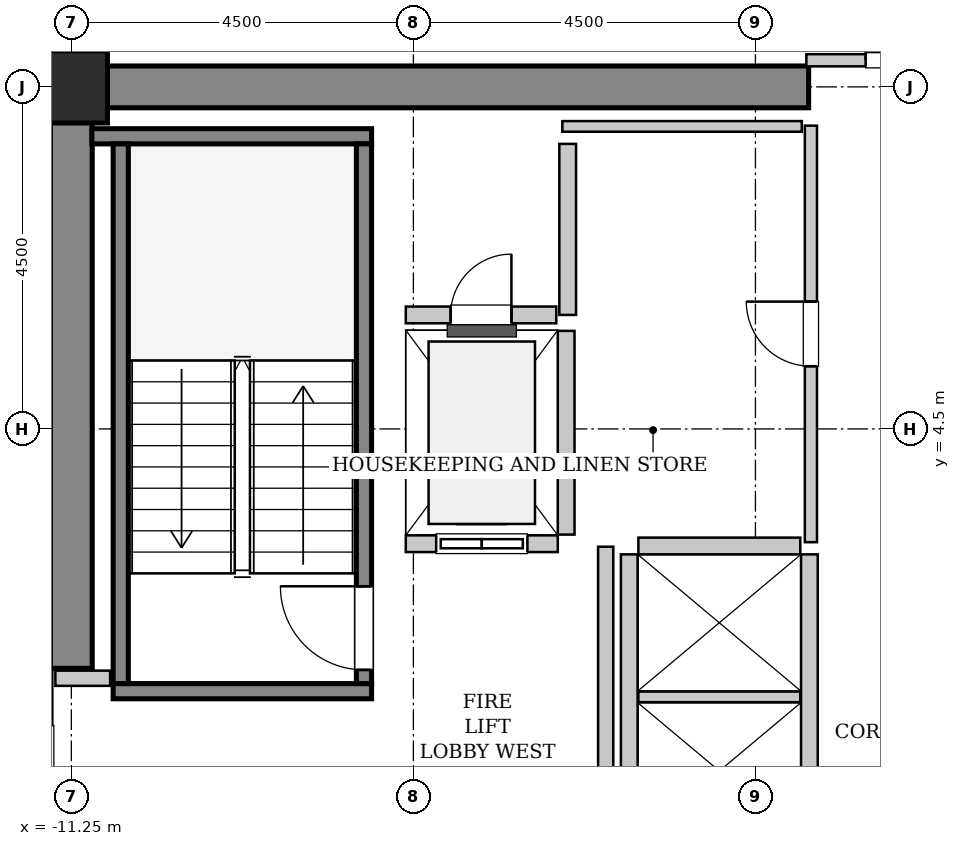
"""IFC4 building model, lengths in metres.
Left out: names, types, materials, properties, quantities, classifications, styles, units other than length and angle.
Written with IfcOpenShell. Run it as: python <this file> out.ifc"""

import sys

from ifc_helpers import new_model, si_unit, direction, frame, frame_2d, origin, origin_2d, place, context, subcontext, project, spatial, rectangle, hollow_rectangle, extrude, source, transform, mapped, element, fill, save


model = new_model("IFC4")
c1 = context("Model", 3, precision=1e-05, world=origin(), true_north=direction((0.0, 1.0)))
c2 = subcontext(c1, "Body", "Model", "MODEL_VIEW")
j1 = project(units=[si_unit("LENGTHUNIT", "METRE"), si_unit("PLANEANGLEUNIT", "RADIAN")], contexts=[c1])
p1 = place(None, origin())
s1 = spatial("IfcSite", under=j1, at=p1, CompositionType="ELEMENT")
p2 = place(p1, origin())
s2 = spatial("IfcBuilding", under=s1, at=p2, CompositionType="ELEMENT")
p3 = place(p2, frame((0.0, 0.0, 164.0)))
s3 = spatial("IfcBuildingStorey", under=s2, at=p3, CompositionType="ELEMENT", Elevation=164.0)
m1 = source(origin(), c2, "Body", "SweptSolid", [
    extrude(rectangle(XDim=9.975, YDim=0.55, at=frame_2d((4.987, 0.0))), origin(), (0.0, 0.0, 1.0), 3.8),
])
p4 = place(p3, frame((-11.525, 9.0, 0.0), z_axis=(0.0, 0.0, 1.0), x_axis=(1.0, 0.0, 0.0)))
e1 = element("IfcWall", 1, at=p4, inside=s3, PredefinedType="SHEAR", context=c2, shape_type="MappedRepresentation", body=[
    mapped(m1, transform((0.0, 0.0, 0.0), x_axis=(1.0, 0.0, 0.0), y_axis=(0.0, 1.0, 0.0), z_axis=(0.0, 0.0, 1.0), scale=1.0)),
])
m2 = source(origin(), c2, "Body", "SweptSolid", [
    extrude(rectangle(XDim=7.375, YDim=0.55, at=frame_2d((3.688, 0.0))), origin(), (0.0, 0.0, 1.0), 3.8),
])
p5 = place(p3, frame((-11.25, 1.35, 0.0), z_axis=(0.0, 0.0, 1.0), x_axis=(0.0, 1.0, 0.0)))
e2 = element("IfcWall", 2, at=p5, inside=s3, PredefinedType="SHEAR", context=c2, shape_type="MappedRepresentation", body=[
    mapped(m2, transform((0.0, 0.0, 0.0), x_axis=(1.0, 0.0, 0.0), y_axis=(0.0, 1.0, 0.0), z_axis=(0.0, 0.0, 1.0), scale=1.0)),
])
m3 = source(origin(), c2, "Body", "SweptSolid", [
    extrude(hollow_rectangle(XDim=0.95, YDim=0.95, WallThickness=0.045, InnerFilletRadius=0.045, OuterFilletRadius=0.09, at=origin_2d()), origin(), (0.0, 0.0, 1.0), 3.8),
])
p6 = place(p3, frame((-11.25, 9.0, 0.0), z_axis=(0.0, 0.0, 1.0), x_axis=(1.0, 0.0, 0.0)))
e3 = element("IfcColumn", 3, at=p6, inside=s3, PredefinedType="COLUMN", context=c2, shape_type="MappedRepresentation", body=[
    mapped(m3, transform((0.0, 0.0, 0.0), x_axis=(1.0, 0.0, 0.0), y_axis=(0.0, 1.0, 0.0), z_axis=(0.0, 0.0, 1.0), scale=1.0)),
])
m4 = source(origin(), c2, "Body", "SweptSolid", [
    extrude(rectangle(XDim=3.4, YDim=0.2, at=frame_2d((1.7, 0.0))), origin(), (0.0, 0.0, 1.0), 3.8),
])
p7 = place(p3, frame((-7.3, 1.05, 0.0), z_axis=(0.0, 0.0, 1.0), x_axis=(-1.0, 0.0, 0.0)))
e4 = element("IfcWall", 4, at=p7, inside=s3, PredefinedType="SOLIDWALL", context=c2, shape_type="MappedRepresentation", body=[
    mapped(m4, transform((0.0, 0.0, 0.0), x_axis=(1.0, 0.0, 0.0), y_axis=(0.0, 1.0, 0.0), z_axis=(0.0, 0.0, 1.0), scale=1.0)),
])
m5 = source(origin(), c2, "Body", "SweptSolid", [
    extrude(rectangle(XDim=3.68, YDim=0.2, at=frame_2d((1.84, 0.0))), origin(), (0.0, 0.0, 1.0), 3.8),
])
p8 = place(p3, frame((-7.3, 8.35, 0.0), z_axis=(0.0, 0.0, 1.0), x_axis=(-1.0, 0.0, 0.0)))
e5 = element("IfcWall", 5, at=p8, inside=s3, PredefinedType="SOLIDWALL", context=c2, shape_type="MappedRepresentation", body=[
    mapped(m5, transform((0.0, 0.0, 0.0), x_axis=(1.0, 0.0, 0.0), y_axis=(0.0, 1.0, 0.0), z_axis=(0.0, 0.0, 1.0), scale=1.0)),
])
m6 = source(origin(), c2, "Body", "SweptSolid", [
    extrude(rectangle(XDim=7.1, YDim=0.2, at=frame_2d((3.55, 0.0))), origin(), (0.0, 0.0, 1.0), 3.8),
])
p9 = place(p3, frame((-7.4, 1.15, 0.0), z_axis=(0.0, 0.0, 1.0), x_axis=(0.0, 1.0, 0.0)))
e6 = element("IfcWall", 6, at=p9, inside=s3, PredefinedType="SOLIDWALL", context=c2, shape_type="MappedRepresentation", body=[
    mapped(m6, transform((0.0, 0.0, 0.0), x_axis=(1.0, 0.0, 0.0), y_axis=(0.0, 1.0, 0.0), z_axis=(0.0, 0.0, 1.0), scale=1.0)),
])
p10 = place(p9, frame((0.18, 0.0, 0.0)))
e7 = element("IfcOpeningElement", 7, at=p10, cuts=e6, PredefinedType="OPENING", context=c2, shape_type="SweptSolid", body=[
    extrude(rectangle(XDim=1.1, YDim=2.15, at=frame_2d((0.55, 1.075))), frame((0.0, 0.11, 0.0), z_axis=(0.0, -1.0, 0.0), x_axis=(1.0, 0.0, 0.0)), (0.0, 0.0, 1.0), 0.22),
])
p11 = place(p3, frame((-10.6, 1.15, 0.0), z_axis=(0.0, 0.0, 1.0), x_axis=(0.0, 1.0, 0.0)))
e8 = element("IfcWall", 8, at=p11, inside=s3, PredefinedType="SOLIDWALL", context=c2, shape_type="MappedRepresentation", body=[
    mapped(m6, transform((0.0, 0.0, 0.0), x_axis=(1.0, 0.0, 0.0), y_axis=(0.0, 1.0, 0.0), z_axis=(0.0, 0.0, 1.0), scale=1.0)),
])
m7 = source(origin(), c2, "Body", "SweptSolid", [
    extrude(rectangle(XDim=2.0, YDim=0.22, at=frame_2d((1.0, 0.0))), origin(), (0.0, 0.0, 1.0), 3.535),
])
p12 = place(p3, frame((-6.85, 2.99, 0.0), z_axis=(0.0, 0.0, 1.0), x_axis=(1.0, 0.0, 0.0)))
e9 = element("IfcWall", 9, at=p12, inside=s3, PredefinedType="SOLIDWALL", context=c2, shape_type="MappedRepresentation", body=[
    mapped(m7, transform((0.0, 0.0, 0.0), x_axis=(1.0, 0.0, 0.0), y_axis=(0.0, 1.0, 0.0), z_axis=(0.0, 0.0, 1.0), scale=1.0)),
])
p13 = place(p12, frame((0.4, 0.0, 0.0)))
e10 = element("IfcOpeningElement", 10, at=p13, cuts=e9, PredefinedType="OPENING", context=c2, shape_type="SweptSolid", body=[
    extrude(rectangle(XDim=1.2, YDim=2.2, at=frame_2d((0.6, 1.1))), frame((0.0, 0.12, 0.0), z_axis=(0.0, -1.0, 0.0), x_axis=(1.0, 0.0, 0.0)), (0.0, 0.0, 1.0), 0.24),
])
m8 = source(origin(), c2, "Body", "SweptSolid", [
    extrude(rectangle(XDim=2.68, YDim=0.22, at=frame_2d((1.34, 0.0))), origin(), (0.0, 0.0, 1.0), 3.535),
])
p14 = place(p3, frame((-4.74, 3.11, 0.0), z_axis=(0.0, 0.0, 1.0), x_axis=(0.0, 1.0, 0.0)))
e11 = element("IfcWall", 11, at=p14, inside=s3, PredefinedType="SOLIDWALL", context=c2, shape_type="MappedRepresentation", body=[
    mapped(m8, transform((0.0, 0.0, 0.0), x_axis=(1.0, 0.0, 0.0), y_axis=(0.0, 1.0, 0.0), z_axis=(0.0, 0.0, 1.0), scale=1.0)),
])
m9 = source(origin(), c2, "Body", "SweptSolid", [
    extrude(rectangle(XDim=5.7, YDim=0.22, at=frame_2d((2.85, 0.0))), origin(), (0.0, 0.0, 1.0), 3.535),
])
for number, where, z_axis, x_axis in (
    (12, (-1.54, -2.85, 0.0), (0.0, 0.0, 1.0), (0.0, 1.0, 0.0)),
    (13, (-3.91, 2.85, 0.0), (0.0, 0.0, 1.0), (0.0, -1.0, 0.0)),
):
    element("IfcWall", number, at=place(p3, frame(where, z_axis=z_axis, x_axis=x_axis)), inside=s3, PredefinedType="SOLIDWALL", context=c2, shape_type="MappedRepresentation", body=[
        mapped(m9, transform((0.0, 0.0, 0.0), x_axis=(1.0, 0.0, 0.0), y_axis=(0.0, 1.0, 0.0), z_axis=(0.0, 0.0, 1.0), scale=1.0)),
    ])
m10 = source(origin(), c2, "Body", "SweptSolid", [
    extrude(rectangle(XDim=2.13, YDim=0.14, at=frame_2d((1.065, 0.0))), origin(), (0.0, 0.0, 1.0), 3.535),
])
p15 = place(p3, frame((-3.79, 0.975, 0.0), z_axis=(0.0, 0.0, 1.0), x_axis=(1.0, 0.0, 0.0)))
e14 = element("IfcWall", 14, at=p15, inside=s3, PredefinedType="PARTITIONING", context=c2, shape_type="MappedRepresentation", body=[
    mapped(m10, transform((0.0, 0.0, 0.0), x_axis=(1.0, 0.0, 0.0), y_axis=(0.0, 1.0, 0.0), z_axis=(0.0, 0.0, 1.0), scale=1.0)),
])
m11 = source(origin(), c2, "Body", "SweptSolid", [
    extrude(rectangle(XDim=2.13, YDim=0.22, at=frame_2d((1.065, 0.0))), origin(), (0.0, 0.0, 1.0), 3.535),
])
p16 = place(p3, frame((-1.66, 2.96, 0.0), z_axis=(0.0, 0.0, 1.0), x_axis=(-1.0, 0.0, 0.0)))
e15 = element("IfcWall", 15, at=p16, inside=s3, PredefinedType="SOLIDWALL", context=c2, shape_type="MappedRepresentation", body=[
    mapped(m11, transform((0.0, 0.0, 0.0), x_axis=(1.0, 0.0, 0.0), y_axis=(0.0, 1.0, 0.0), z_axis=(0.0, 0.0, 1.0), scale=1.0)),
])
m12 = source(origin(), c2, "Body", "SweptSolid", [
    extrude(rectangle(XDim=2.25, YDim=0.22, at=frame_2d((1.125, 0.0))), origin(), (0.0, 0.0, 1.0), 3.535),
])
p17 = place(p3, frame((-4.72, 6.0, 0.0), z_axis=(0.0, 0.0, 1.0), x_axis=(0.0, 1.0, 0.0)))
e16 = element("IfcWall", 16, at=p17, inside=s3, PredefinedType="SOLIDWALL", context=c2, shape_type="MappedRepresentation", body=[
    mapped(m12, transform((0.0, 0.0, 0.0), x_axis=(1.0, 0.0, 0.0), y_axis=(0.0, 1.0, 0.0), z_axis=(0.0, 0.0, 1.0), scale=1.0)),
])
m13 = source(origin(), c2, "Body", "SweptSolid", [
    extrude(rectangle(XDim=1.98, YDim=0.22, at=frame_2d((0.99, 0.0))), origin(), (0.0, 0.0, 1.0), 3.535),
])
p18 = place(p3, frame((-6.85, 6.0, 0.0), z_axis=(0.0, 0.0, 1.0), x_axis=(1.0, 0.0, 0.0)))
e17 = element("IfcWall", 17, at=p18, inside=s3, PredefinedType="SOLIDWALL", context=c2, shape_type="MappedRepresentation", body=[
    mapped(m13, transform((0.0, 0.0, 0.0), x_axis=(1.0, 0.0, 0.0), y_axis=(0.0, 1.0, 0.0), z_axis=(0.0, 0.0, 1.0), scale=1.0)),
])
p19 = place(p18, frame((0.59, 0.0, 0.0)))
e18 = element("IfcOpeningElement", 18, at=p19, cuts=e17, PredefinedType="OPENING", context=c2, shape_type="SweptSolid", body=[
    extrude(rectangle(XDim=0.8, YDim=2.0, at=frame_2d((0.4, 1.0))), frame((0.0, 0.12, 0.0), z_axis=(0.0, -1.0, 0.0), x_axis=(1.0, 0.0, 0.0)), (0.0, 0.0, 1.0), 0.24),
])
m14 = source(origin(), c2, "Body", "SweptSolid", [
    extrude(rectangle(XDim=5.9, YDim=0.2, at=frame_2d((2.95, 0.0))), origin(), (0.0, 0.0, 1.0), 3.535),
])
p20 = place(p3, frame((-4.22, -2.95, 0.0), z_axis=(0.0, 0.0, 1.0), x_axis=(0.0, 1.0, 0.0)))
e19 = element("IfcWall", 19, at=p20, inside=s3, PredefinedType="PARTITIONING", context=c2, shape_type="MappedRepresentation", body=[
    mapped(m14, transform((0.0, 0.0, 0.0), x_axis=(1.0, 0.0, 0.0), y_axis=(0.0, 1.0, 0.0), z_axis=(0.0, 0.0, 1.0), scale=1.0)),
])
m15 = source(origin(), c2, "Body", "SweptSolid", [
    extrude(rectangle(XDim=0.72, YDim=0.2, at=frame_2d((0.36, 0.0))), origin(), (0.0, 0.0, 1.0), 3.535),
])
p21 = place(p3, frame((-11.46, 1.22, 0.0), z_axis=(0.0, 0.0, 1.0), x_axis=(1.0, 0.0, 0.0)))
e20 = element("IfcWall", 20, at=p21, inside=s3, PredefinedType="PARTITIONING", context=c2, shape_type="MappedRepresentation", body=[
    mapped(m15, transform((0.0, 0.0, 0.0), x_axis=(1.0, 0.0, 0.0), y_axis=(0.0, 1.0, 0.0), z_axis=(0.0, 0.0, 1.0), scale=1.0)),
])
m16 = source(origin(), c2, "Body", "SweptSolid", [
    extrude(rectangle(XDim=3.16, YDim=0.16, at=frame_2d((1.58, 0.0))), origin(), (0.0, 0.0, 1.0), 2.425),
])
p22 = place(p3, frame((-1.58, 9.35, 0.0), z_axis=(0.0, 0.0, 1.0), x_axis=(1.0, 0.0, 0.0)))
e21 = element("IfcWall", 21, at=p22, inside=s3, PredefinedType="PARTITIONING", context=c2, shape_type="MappedRepresentation", body=[
    mapped(m16, transform((0.0, 0.0, 0.0), x_axis=(1.0, 0.0, 0.0), y_axis=(0.0, 1.0, 0.0), z_axis=(0.0, 0.0, 1.0), scale=1.0)),
])
p23 = place(p22, frame((0.78, 0.0, 0.0)))
e22 = element("IfcOpeningElement", 22, at=p23, cuts=e21, PredefinedType="OPENING", context=c2, shape_type="SweptSolid", body=[
    extrude(rectangle(XDim=1.6, YDim=2.3, at=frame_2d((0.8, 1.15))), frame((0.0, 0.09, 0.0), z_axis=(0.0, -1.0, 0.0), x_axis=(1.0, 0.0, 0.0)), (0.0, 0.0, 1.0), 0.18),
])
m17 = source(origin(), c2, "Body", "SweptSolid", [
    extrude(rectangle(XDim=5.48, YDim=0.16, at=frame_2d((2.74, 0.0))), origin(), (0.0, 0.0, 1.0), 3.535),
])
p24 = place(p3, frame((-1.52, 3.01, 0.0), z_axis=(0.0, 0.0, 1.0), x_axis=(0.0, 1.0, 0.0)))
e23 = element("IfcWall", 23, at=p24, inside=s3, PredefinedType="PARTITIONING", context=c2, shape_type="MappedRepresentation", body=[
    mapped(m17, transform((0.0, 0.0, 0.0), x_axis=(1.0, 0.0, 0.0), y_axis=(0.0, 1.0, 0.0), z_axis=(0.0, 0.0, 1.0), scale=1.0)),
])
p25 = place(p24, frame((2.315, 0.0, 0.0)))
e24 = element("IfcOpeningElement", 24, at=p25, cuts=e23, PredefinedType="OPENING", context=c2, shape_type="SweptSolid", body=[
    extrude(rectangle(XDim=0.85, YDim=2.1, at=frame_2d((0.425, 1.05))), frame((0.0, 0.09, 0.0), z_axis=(0.0, -1.0, 0.0), x_axis=(1.0, 0.0, 0.0)), (0.0, 0.0, 1.0), 0.18),
])
m18 = source(origin(), c2, "Body", "SweptSolid", [
    extrude(rectangle(XDim=3.15, YDim=0.14, at=frame_2d((1.575, 0.0))), origin(), (0.0, 0.0, 1.0), 3.535),
])
p26 = place(p3, frame((-4.79, 8.48, 0.0), z_axis=(0.0, 0.0, 1.0), x_axis=(1.0, 0.0, 0.0)))
e25 = element("IfcWall", 25, at=p26, inside=s3, PredefinedType="PARTITIONING", context=c2, shape_type="MappedRepresentation", body=[
    mapped(m18, transform((0.0, 0.0, 0.0), x_axis=(1.0, 0.0, 0.0), y_axis=(0.0, 1.0, 0.0), z_axis=(0.0, 0.0, 1.0), scale=1.0)),
])
m19 = source(origin(), c2, "Body", "SweptSolid", [
    extrude(rectangle(XDim=1.1, YDim=2.15, at=frame_2d((0.55, 1.075))), frame((0.0, 0.025, 0.0), z_axis=(0.0, -1.0, 0.0), x_axis=(1.0, 0.0, 0.0)), (0.0, 0.0, 1.0), 0.05),
])
p27 = place(p10, origin())
e26 = element("IfcDoor", 26, at=p27, inside=s3, OperationType="SINGLE_SWING_RIGHT", PredefinedType="DOOR", context=c2, shape_type="MappedRepresentation", body=[
    mapped(m19, transform((0.0, 0.0, 0.0), x_axis=(1.0, 0.0, 0.0), y_axis=(0.0, 1.0, 0.0), z_axis=(0.0, 0.0, 1.0), scale=1.0)),
])
fill(e7, e26)
m20 = source(origin(), c2, "Body", "SweptSolid", [
    extrude(rectangle(XDim=1.2, YDim=2.2, at=frame_2d((0.6, 1.1))), frame((0.0, 0.025, 0.0), z_axis=(0.0, -1.0, 0.0), x_axis=(1.0, 0.0, 0.0)), (0.0, 0.0, 1.0), 0.05),
])
p28 = place(p13, origin())
e27 = element("IfcDoor", 27, at=p28, inside=s3, OperationType="SLIDING_TO_LEFT", PredefinedType="DOOR", context=c2, shape_type="MappedRepresentation", body=[
    mapped(m20, transform((0.0, 0.0, 0.0), x_axis=(1.0, 0.0, 0.0), y_axis=(0.0, 1.0, 0.0), z_axis=(0.0, 0.0, 1.0), scale=1.0)),
])
fill(e10, e27)
m21 = source(origin(), c2, "Body", "SweptSolid", [
    extrude(rectangle(XDim=0.8, YDim=2.0, at=frame_2d((0.4, 1.0))), frame((0.0, 0.025, 0.0), z_axis=(0.0, -1.0, 0.0), x_axis=(1.0, 0.0, 0.0)), (0.0, 0.0, 1.0), 0.05),
])
p29 = place(p19, origin())
e28 = element("IfcDoor", 28, at=p29, inside=s3, OperationType="SINGLE_SWING_RIGHT", PredefinedType="TRAPDOOR", context=c2, shape_type="MappedRepresentation", body=[
    mapped(m21, transform((0.0, 0.0, 0.0), x_axis=(1.0, 0.0, 0.0), y_axis=(0.0, 1.0, 0.0), z_axis=(0.0, 0.0, 1.0), scale=1.0)),
])
fill(e18, e28)
m22 = source(origin(), c2, "Body", "SweptSolid", [
    extrude(rectangle(XDim=1.6, YDim=2.3, at=frame_2d((0.8, 1.15))), frame((0.0, 0.025, 0.0), z_axis=(0.0, -1.0, 0.0), x_axis=(1.0, 0.0, 0.0)), (0.0, 0.0, 1.0), 0.05),
])
p30 = place(p23, origin())
e29 = element("IfcDoor", 29, at=p30, inside=s3, OperationType="DOUBLE_DOOR_SINGLE_SWING", PredefinedType="DOOR", context=c2, shape_type="MappedRepresentation", body=[
    mapped(m22, transform((0.0, 0.0, 0.0), x_axis=(1.0, 0.0, 0.0), y_axis=(0.0, 1.0, 0.0), z_axis=(0.0, 0.0, 1.0), scale=1.0)),
])
fill(e22, e29)
m23 = source(origin(), c2, "Body", "SweptSolid", [
    extrude(rectangle(XDim=0.85, YDim=2.1, at=frame_2d((0.425, 1.05))), frame((0.0, 0.025, 0.0), z_axis=(0.0, -1.0, 0.0), x_axis=(1.0, 0.0, 0.0)), (0.0, 0.0, 1.0), 0.05),
])
p31 = place(p25, origin())
e30 = element("IfcDoor", 30, at=p31, inside=s3, OperationType="SINGLE_SWING_RIGHT", PredefinedType="DOOR", context=c2, shape_type="MappedRepresentation", body=[
    mapped(m23, transform((0.0, 0.0, 0.0), x_axis=(1.0, 0.0, 0.0), y_axis=(0.0, 1.0, 0.0), z_axis=(0.0, 0.0, 1.0), scale=1.0)),
])
fill(e24, e30)
save(model, sys.argv[1])
